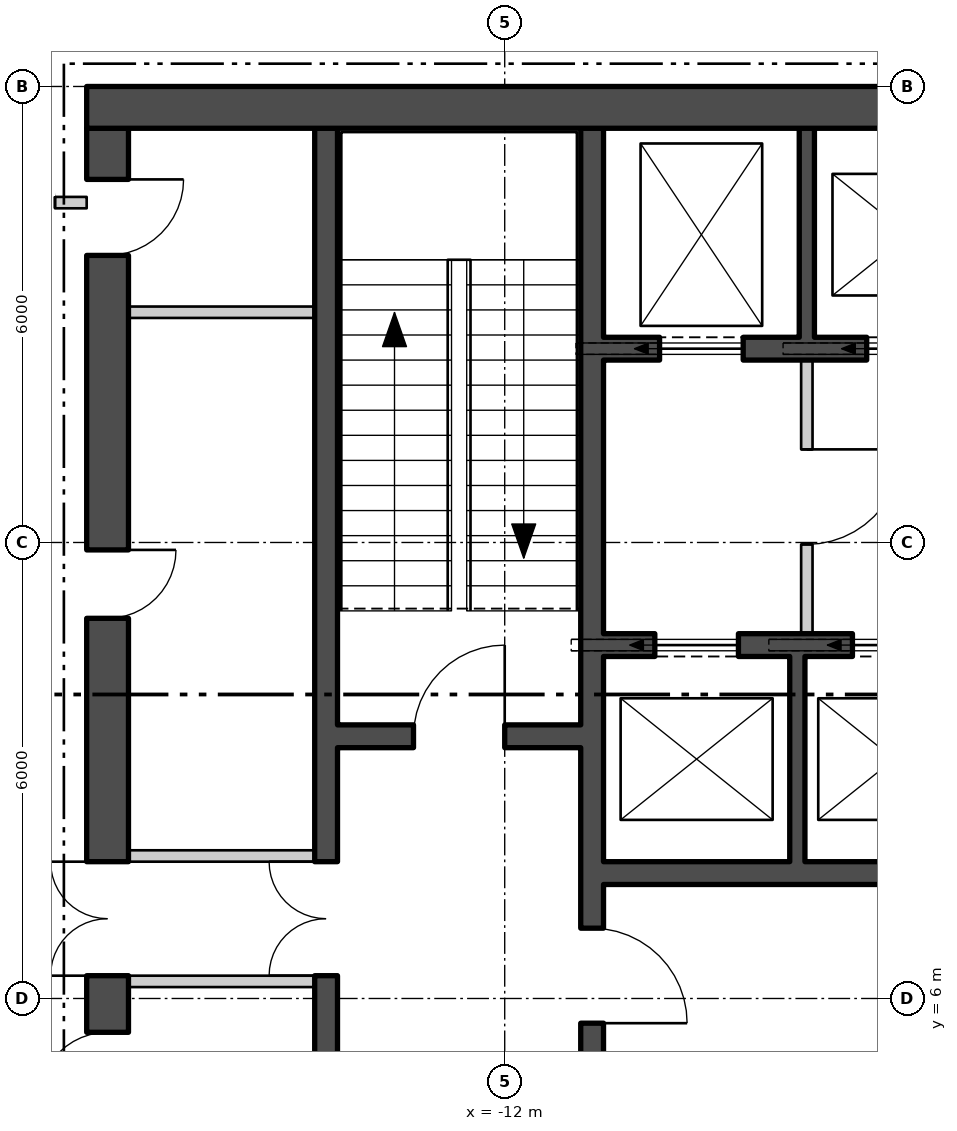
"""IFC4 building model, lengths in metres.
Left out: names, types, materials, properties, quantities, classifications, styles, units other than length and angle.
Written with IfcOpenShell. Run it as: python <this file> out.ifc"""

import sys

from ifc_helpers import new_model, si_unit, direction, frame, frame_2d, origin, place, context, subcontext, project, spatial, polyline, rectangle, outline, extrude, element, fill, save


model = new_model("IFC4")
c1 = context("Model", 3, precision=1e-05, world=origin(), true_north=direction((0.0, 1.0)))
c2 = subcontext(c1, "Body", "Model", "MODEL_VIEW")
j1 = project(units=[si_unit("LENGTHUNIT", "METRE"), si_unit("PLANEANGLEUNIT", "RADIAN")], contexts=[c1])
p1 = place(None, origin())
s1 = spatial("IfcSite", under=j1, at=p1, CompositionType="ELEMENT")
p2 = place(p1, origin())
s2 = spatial("IfcBuilding", under=s1, at=p2, CompositionType="ELEMENT")
p3 = place(p2, frame((0.0, 0.0, 97.8)))
s3 = spatial("IfcBuildingStorey", under=s2, at=p3, CompositionType="ELEMENT", Elevation=97.8)
p4 = place(p3, frame((-27.775, 11.479, -0.18), z_axis=(0.0, 0.0, 1.0), x_axis=(0.500000711659, -0.866024992908, 0.0)))
e1 = element("IfcWall", 1, at=p4, inside=s3, PredefinedType="SOLIDWALL", context=c2, shape_type="SweptSolid", body=[
    extrude(outline(polyline([(-0.13, -0.225), (45.87, -0.225), (45.61, 0.225), (0.13, 0.225), (-0.13, -0.225)])), origin(), (0.0, 0.0, 1.0), 4.28),
])
p5 = place(p4, frame((1.424, 0.0, 1.08)))
e2 = element("IfcOpeningElement", 2, at=p5, cuts=e1, PredefinedType="OPENING", context=c2, shape_type="SweptSolid", body=[
    extrude(rectangle(XDim=2.4, YDim=2.6, at=frame_2d((1.2, 1.3))), frame((0.0, 0.235, 0.0), z_axis=(0.0, -1.0, 0.0), x_axis=(1.0, 0.0, 0.0)), (0.0, 0.0, 1.0), 0.47),
])
p6 = place(p4, frame((5.893, 0.0, 1.08)))
e3 = element("IfcOpeningElement", 3, at=p6, cuts=e1, PredefinedType="OPENING", context=c2, shape_type="SweptSolid", body=[
    extrude(rectangle(XDim=2.4, YDim=2.6, at=frame_2d((1.2, 1.3))), frame((0.0, 0.235, 0.0), z_axis=(0.0, -1.0, 0.0), x_axis=(1.0, 0.0, 0.0)), (0.0, 0.0, 1.0), 0.47),
])
p7 = place(p4, frame((10.401, 0.0, 1.08)))
e4 = element("IfcOpeningElement", 4, at=p7, cuts=e1, PredefinedType="OPENING", context=c2, shape_type="SweptSolid", body=[
    extrude(rectangle(XDim=2.4, YDim=2.6, at=frame_2d((1.2, 1.3))), frame((0.0, 0.235, 0.0), z_axis=(0.0, -1.0, 0.0), x_axis=(1.0, 0.0, 0.0)), (0.0, 0.0, 1.0), 0.47),
])
p8 = place(p4, frame((14.909, 0.0, 1.08)))
e5 = element("IfcOpeningElement", 5, at=p8, cuts=e1, PredefinedType="OPENING", context=c2, shape_type="SweptSolid", body=[
    extrude(rectangle(XDim=2.4, YDim=2.6, at=frame_2d((1.2, 1.3))), frame((0.0, 0.235, 0.0), z_axis=(0.0, -1.0, 0.0), x_axis=(1.0, 0.0, 0.0)), (0.0, 0.0, 1.0), 0.47),
])
p9 = place(p4, frame((19.416, 0.0, 1.08)))
e6 = element("IfcOpeningElement", 6, at=p9, cuts=e1, PredefinedType="OPENING", context=c2, shape_type="SweptSolid", body=[
    extrude(rectangle(XDim=2.4, YDim=2.6, at=frame_2d((1.2, 1.3))), frame((0.0, 0.235, 0.0), z_axis=(0.0, -1.0, 0.0), x_axis=(1.0, 0.0, 0.0)), (0.0, 0.0, 1.0), 0.47),
])
p10 = place(p4, frame((23.924, 0.0, 1.08)))
e7 = element("IfcOpeningElement", 7, at=p10, cuts=e1, PredefinedType="OPENING", context=c2, shape_type="SweptSolid", body=[
    extrude(rectangle(XDim=2.4, YDim=2.6, at=frame_2d((1.2, 1.3))), frame((0.0, 0.235, 0.0), z_axis=(0.0, -1.0, 0.0), x_axis=(1.0, 0.0, 0.0)), (0.0, 0.0, 1.0), 0.47),
])
p11 = place(p4, frame((28.431, 0.0, 1.08)))
e8 = element("IfcOpeningElement", 8, at=p11, cuts=e1, PredefinedType="OPENING", context=c2, shape_type="SweptSolid", body=[
    extrude(rectangle(XDim=2.4, YDim=2.6, at=frame_2d((1.2, 1.3))), frame((0.0, 0.235, 0.0), z_axis=(0.0, -1.0, 0.0), x_axis=(1.0, 0.0, 0.0)), (0.0, 0.0, 1.0), 0.47),
])
p12 = place(p4, frame((32.939, 0.0, 1.08)))
e9 = element("IfcOpeningElement", 9, at=p12, cuts=e1, PredefinedType="OPENING", context=c2, shape_type="SweptSolid", body=[
    extrude(rectangle(XDim=2.4, YDim=2.6, at=frame_2d((1.2, 1.3))), frame((0.0, 0.235, 0.0), z_axis=(0.0, -1.0, 0.0), x_axis=(1.0, 0.0, 0.0)), (0.0, 0.0, 1.0), 0.47),
])
p13 = place(p4, frame((37.447, 0.0, 1.08)))
e10 = element("IfcOpeningElement", 10, at=p13, cuts=e1, PredefinedType="OPENING", context=c2, shape_type="SweptSolid", body=[
    extrude(rectangle(XDim=2.4, YDim=2.6, at=frame_2d((1.2, 1.3))), frame((0.0, 0.235, 0.0), z_axis=(0.0, -1.0, 0.0), x_axis=(1.0, 0.0, 0.0)), (0.0, 0.0, 1.0), 0.47),
])
p14 = place(p4, frame((41.916, 0.0, 1.08)))
e11 = element("IfcOpeningElement", 11, at=p14, cuts=e1, PredefinedType="OPENING", context=c2, shape_type="SweptSolid", body=[
    extrude(rectangle(XDim=2.4, YDim=2.6, at=frame_2d((1.2, 1.3))), frame((0.0, 0.235, 0.0), z_axis=(0.0, -1.0, 0.0), x_axis=(1.0, 0.0, 0.0)), (0.0, 0.0, 1.0), 0.47),
])
p15 = place(p3, frame((-17.5, 17.725, 0.0), z_axis=(0.0, 0.0, 1.0), x_axis=(1.0, 0.0, 0.0)))
e12 = element("IfcWall", 12, at=p15, inside=s3, PredefinedType="SHEAR", context=c2, shape_type="SweptSolid", body=[
    extrude(rectangle(XDim=35.0, YDim=0.55, at=frame_2d((17.5, 0.0))), origin(), (0.0, 0.0, 1.0), 4.3),
])
p16 = place(p3, frame((-17.225, 0.55, 0.0), z_axis=(0.0, 0.0, 1.0), x_axis=(0.0, 1.0, 0.0)))
e13 = element("IfcWall", 13, at=p16, inside=s3, PredefinedType="SHEAR", context=c2, shape_type="SweptSolid", body=[
    extrude(rectangle(XDim=16.9, YDim=0.55, at=frame_2d((8.45, 0.0))), origin(), (0.0, 0.0, 1.0), 4.3),
])
p17 = place(p16, frame((5.75, 0.0, 0.0)))
e14 = element("IfcOpeningElement", 14, at=p17, cuts=e13, PredefinedType="OPENING", context=c2, shape_type="SweptSolid", body=[
    extrude(rectangle(XDim=1.5, YDim=2.1, at=frame_2d((0.75, 1.05))), frame((0.0, 0.285, 0.0), z_axis=(0.0, -1.0, 0.0), x_axis=(1.0, 0.0, 0.0)), (0.0, 0.0, 1.0), 0.57),
])
p18 = place(p16, frame((1.23, 0.0, 0.0)))
e15 = element("IfcOpeningElement", 15, at=p18, cuts=e13, PredefinedType="OPENING", context=c2, shape_type="SweptSolid", body=[
    extrude(rectangle(XDim=0.9, YDim=2.1, at=frame_2d((0.45, 1.05))), frame((0.0, 0.285, 0.0), z_axis=(0.0, -1.0, 0.0), x_axis=(1.0, 0.0, 0.0)), (0.0, 0.0, 1.0), 0.57),
])
p19 = place(p16, frame((4.105, 0.0, 0.0)))
e16 = element("IfcOpeningElement", 16, at=p19, cuts=e13, PredefinedType="OPENING", context=c2, shape_type="SweptSolid", body=[
    extrude(rectangle(XDim=0.9, YDim=2.1, at=frame_2d((0.45, 1.05))), frame((0.0, 0.285, 0.0), z_axis=(0.0, -1.0, 0.0), x_axis=(1.0, 0.0, 0.0)), (0.0, 0.0, 1.0), 0.57),
])
p20 = place(p16, frame((10.452, 0.0, 0.0)))
e17 = element("IfcOpeningElement", 17, at=p20, cuts=e13, PredefinedType="OPENING", context=c2, shape_type="SweptSolid", body=[
    extrude(rectangle(XDim=0.9, YDim=2.1, at=frame_2d((0.45, 1.05))), frame((0.0, 0.285, 0.0), z_axis=(0.0, -1.0, 0.0), x_axis=(1.0, 0.0, 0.0)), (0.0, 0.0, 1.0), 0.57),
])
p21 = place(p16, frame((15.227, 0.0, 0.0)))
e18 = element("IfcOpeningElement", 18, at=p21, cuts=e13, PredefinedType="OPENING", context=c2, shape_type="SweptSolid", body=[
    extrude(rectangle(XDim=1.0, YDim=2.1, at=frame_2d((0.5, 1.05))), frame((0.0, 0.285, 0.0), z_axis=(0.0, -1.0, 0.0), x_axis=(1.0, 0.0, 0.0)), (0.0, 0.0, 1.0), 0.57),
])
p22 = place(p3, frame((-10.85, 0.55, 0.0), z_axis=(0.0, 0.0, 1.0), x_axis=(0.0, 1.0, 0.0)))
e19 = element("IfcWall", 19, at=p22, inside=s3, PredefinedType="SHEAR", context=c2, shape_type="SweptSolid", body=[
    extrude(rectangle(XDim=16.9, YDim=0.3, at=frame_2d((8.45, 0.0))), origin(), (0.0, 0.0, 1.0), 4.3),
])
p23 = place(p22, frame((5.125, 0.0, 0.0)))
e20 = element("IfcOpeningElement", 20, at=p23, cuts=e19, PredefinedType="OPENING", context=c2, shape_type="SweptSolid", body=[
    extrude(rectangle(XDim=1.25, YDim=2.1, at=frame_2d((0.625, 1.05))), frame((0.0, 0.16, 0.0), z_axis=(0.0, -1.0, 0.0), x_axis=(1.0, 0.0, 0.0)), (0.0, 0.0, 1.0), 0.32),
])
p24 = place(p22, frame((1.55, 0.0, 0.0)))
e21 = element("IfcOpeningElement", 21, at=p24, cuts=e19, PredefinedType="OPENING", context=c2, shape_type="SweptSolid", body=[
    extrude(rectangle(XDim=1.0, YDim=2.1, at=frame_2d((0.5, 1.05))), frame((0.0, 0.16, 0.0), z_axis=(0.0, -1.0, 0.0), x_axis=(1.0, 0.0, 0.0)), (0.0, 0.0, 1.0), 0.32),
])
p25 = place(p3, frame((-14.35, 0.55, 0.0), z_axis=(0.0, 0.0, 1.0), x_axis=(0.0, 1.0, 0.0)))
e22 = element("IfcWall", 22, at=p25, inside=s3, PredefinedType="SHEAR", context=c2, shape_type="SweptSolid", body=[
    extrude(rectangle(XDim=16.9, YDim=0.3, at=frame_2d((8.45, 0.0))), origin(), (0.0, 0.0, 1.0), 4.3),
])
p26 = place(p25, frame((5.75, 0.0, 0.0)))
e23 = element("IfcOpeningElement", 23, at=p26, cuts=e22, PredefinedType="OPENING", context=c2, shape_type="SweptSolid", body=[
    extrude(rectangle(XDim=1.5, YDim=2.1, at=frame_2d((0.75, 1.05))), frame((0.0, 0.16, 0.0), z_axis=(0.0, -1.0, 0.0), x_axis=(1.0, 0.0, 0.0)), (0.0, 0.0, 1.0), 0.32),
])
p27 = place(p3, frame((-14.2, 9.45, 0.0), z_axis=(0.0, 0.0, 1.0), x_axis=(1.0, 0.0, 0.0)))
e24 = element("IfcWall", 24, at=p27, inside=s3, PredefinedType="SHEAR", context=c2, shape_type="SweptSolid", body=[
    extrude(rectangle(XDim=3.2, YDim=0.3, at=frame_2d((1.6, 0.0))), origin(), (0.0, 0.0, 1.0), 4.3),
])
p28 = place(p27, frame((1.0, 0.0, 0.0)))
e25 = element("IfcOpeningElement", 25, at=p28, cuts=e24, PredefinedType="OPENING", context=c2, shape_type="SweptSolid", body=[
    extrude(rectangle(XDim=1.2, YDim=2.1, at=frame_2d((0.6, 1.05))), frame((0.0, 0.16, 0.0), z_axis=(0.0, -1.0, 0.0), x_axis=(1.0, 0.0, 0.0)), (0.0, 0.0, 1.0), 0.32),
])
p29 = place(p3, frame((-10.7, 14.55, 0.0), z_axis=(0.0, 0.0, 1.0), x_axis=(1.0, 0.0, 0.0)))
e26 = element("IfcWall", 26, at=p29, inside=s3, PredefinedType="SHEAR", context=c2, shape_type="SweptSolid", body=[
    extrude(rectangle(XDim=21.4, YDim=0.3, at=frame_2d((10.7, 0.0))), origin(), (0.0, 0.0, 1.0), 4.3),
])
p30 = place(p29, frame((0.738, 0.0, 0.0)))
e27 = element("IfcOpeningElement", 27, at=p30, cuts=e26, PredefinedType="OPENING", context=c2, shape_type="SweptSolid", body=[
    extrude(rectangle(XDim=1.1, YDim=2.1, at=frame_2d((0.55, 1.05))), frame((0.0, 0.16, 0.0), z_axis=(0.0, -1.0, 0.0), x_axis=(1.0, 0.0, 0.0)), (0.0, 0.0, 1.0), 0.32),
])
p31 = place(p29, frame((3.462, 0.0, 0.0)))
e28 = element("IfcOpeningElement", 28, at=p31, cuts=e26, PredefinedType="OPENING", context=c2, shape_type="SweptSolid", body=[
    extrude(rectangle(XDim=1.1, YDim=2.1, at=frame_2d((0.55, 1.05))), frame((0.0, 0.16, 0.0), z_axis=(0.0, -1.0, 0.0), x_axis=(1.0, 0.0, 0.0)), (0.0, 0.0, 1.0), 0.32),
])
p32 = place(p29, frame((6.138, 0.0, 0.0)))
e29 = element("IfcOpeningElement", 29, at=p32, cuts=e26, PredefinedType="OPENING", context=c2, shape_type="SweptSolid", body=[
    extrude(rectangle(XDim=1.1, YDim=2.1, at=frame_2d((0.55, 1.05))), frame((0.0, 0.16, 0.0), z_axis=(0.0, -1.0, 0.0), x_axis=(1.0, 0.0, 0.0)), (0.0, 0.0, 1.0), 0.32),
])
p33 = place(p29, frame((8.812, 0.0, 0.0)))
e30 = element("IfcOpeningElement", 30, at=p33, cuts=e26, PredefinedType="OPENING", context=c2, shape_type="SweptSolid", body=[
    extrude(rectangle(XDim=1.1, YDim=2.1, at=frame_2d((0.55, 1.05))), frame((0.0, 0.16, 0.0), z_axis=(0.0, -1.0, 0.0), x_axis=(1.0, 0.0, 0.0)), (0.0, 0.0, 1.0), 0.32),
])
p34 = place(p29, frame((14.162, 0.0, 0.0)))
e31 = element("IfcOpeningElement", 31, at=p34, cuts=e26, PredefinedType="OPENING", context=c2, shape_type="SweptSolid", body=[
    extrude(rectangle(XDim=1.1, YDim=2.1, at=frame_2d((0.55, 1.05))), frame((0.0, 0.16, 0.0), z_axis=(0.0, -1.0, 0.0), x_axis=(1.0, 0.0, 0.0)), (0.0, 0.0, 1.0), 0.32),
])
p35 = place(p29, frame((16.837, 0.0, 0.0)))
e32 = element("IfcOpeningElement", 32, at=p35, cuts=e26, PredefinedType="OPENING", context=c2, shape_type="SweptSolid", body=[
    extrude(rectangle(XDim=1.1, YDim=2.1, at=frame_2d((0.55, 1.05))), frame((0.0, 0.16, 0.0), z_axis=(0.0, -1.0, 0.0), x_axis=(1.0, 0.0, 0.0)), (0.0, 0.0, 1.0), 0.32),
])
p36 = place(p29, frame((19.562, 0.0, 0.0)))
e33 = element("IfcOpeningElement", 33, at=p36, cuts=e26, PredefinedType="OPENING", context=c2, shape_type="SweptSolid", body=[
    extrude(rectangle(XDim=1.1, YDim=2.1, at=frame_2d((0.55, 1.05))), frame((0.0, 0.16, 0.0), z_axis=(0.0, -1.0, 0.0), x_axis=(1.0, 0.0, 0.0)), (0.0, 0.0, 1.0), 0.32),
])
p37 = place(p3, frame((-10.7, 10.65, 0.0), z_axis=(0.0, 0.0, 1.0), x_axis=(1.0, 0.0, 0.0)))
e34 = element("IfcWall", 34, at=p37, inside=s3, PredefinedType="SHEAR", context=c2, shape_type="SweptSolid", body=[
    extrude(rectangle(XDim=10.3, YDim=0.3, at=frame_2d((5.15, 0.0))), origin(), (0.0, 0.0, 1.0), 4.3),
])
p38 = place(p37, frame((0.675, 0.0, 0.0)))
e35 = element("IfcOpeningElement", 35, at=p38, cuts=e34, PredefinedType="OPENING", context=c2, shape_type="SweptSolid", body=[
    extrude(rectangle(XDim=1.1, YDim=2.1, at=frame_2d((0.55, 1.05))), frame((0.0, 0.16, 0.0), z_axis=(0.0, -1.0, 0.0), x_axis=(1.0, 0.0, 0.0)), (0.0, 0.0, 1.0), 0.32),
])
p39 = place(p37, frame((3.275, 0.0, 0.0)))
e36 = element("IfcOpeningElement", 36, at=p39, cuts=e34, PredefinedType="OPENING", context=c2, shape_type="SweptSolid", body=[
    extrude(rectangle(XDim=1.1, YDim=2.1, at=frame_2d((0.55, 1.05))), frame((0.0, 0.16, 0.0), z_axis=(0.0, -1.0, 0.0), x_axis=(1.0, 0.0, 0.0)), (0.0, 0.0, 1.0), 0.32),
])
p40 = place(p37, frame((5.825, 0.0, 0.0)))
e37 = element("IfcOpeningElement", 37, at=p40, cuts=e34, PredefinedType="OPENING", context=c2, shape_type="SweptSolid", body=[
    extrude(rectangle(XDim=1.1, YDim=2.1, at=frame_2d((0.55, 1.05))), frame((0.0, 0.16, 0.0), z_axis=(0.0, -1.0, 0.0), x_axis=(1.0, 0.0, 0.0)), (0.0, 0.0, 1.0), 0.32),
])
p41 = place(p37, frame((8.375, 0.0, 0.0)))
e38 = element("IfcOpeningElement", 38, at=p41, cuts=e34, PredefinedType="OPENING", context=c2, shape_type="SweptSolid", body=[
    extrude(rectangle(XDim=1.1, YDim=2.1, at=frame_2d((0.55, 1.05))), frame((0.0, 0.16, 0.0), z_axis=(0.0, -1.0, 0.0), x_axis=(1.0, 0.0, 0.0)), (0.0, 0.0, 1.0), 0.32),
])
p42 = place(p3, frame((-10.7, 7.65, 0.0), z_axis=(0.0, 0.0, 1.0), x_axis=(1.0, 0.0, 0.0)))
e39 = element("IfcWall", 39, at=p42, inside=s3, PredefinedType="SHEAR", context=c2, shape_type="SweptSolid", body=[
    extrude(rectangle(XDim=10.3, YDim=0.3, at=frame_2d((5.15, 0.0))), origin(), (0.0, 0.0, 1.0), 4.3),
])
p43 = place(p3, frame((-8.025, 14.7, 0.0), z_axis=(0.0, 0.0, 1.0), x_axis=(0.0, 1.0, 0.0)))
e40 = element("IfcWall", 40, at=p43, inside=s3, PredefinedType="SHEAR", context=c2, shape_type="SweptSolid", body=[
    extrude(rectangle(XDim=2.75, YDim=0.2, at=frame_2d((1.375, 0.0))), origin(), (0.0, 0.0, 1.0), 4.3),
])
p44 = place(p3, frame((-8.15, 7.8, 0.0), z_axis=(0.0, 0.0, 1.0), x_axis=(0.0, 1.0, 0.0)))
e41 = element("IfcWall", 41, at=p44, inside=s3, PredefinedType="SHEAR", context=c2, shape_type="SweptSolid", body=[
    extrude(rectangle(XDim=2.7, YDim=0.2, at=frame_2d((1.35, 0.0))), origin(), (0.0, 0.0, 1.0), 4.3),
])
p45 = place(p3, frame((-8.025, 10.8, 0.0), z_axis=(0.0, 0.0, 1.0), x_axis=(0.0, 1.0, 0.0)))
e42 = element("IfcWall", 42, at=p45, inside=s3, PredefinedType="PARTITIONING", context=c2, shape_type="SweptSolid", body=[
    extrude(rectangle(XDim=3.6, YDim=0.15, at=frame_2d((1.8, 0.0))), origin(), (0.0, 0.0, 1.0), 4.3),
])
p46 = place(p45, frame((1.175, 0.0, 0.0)))
e43 = element("IfcOpeningElement", 43, at=p46, cuts=e42, PredefinedType="OPENING", context=c2, shape_type="SweptSolid", body=[
    extrude(rectangle(XDim=1.25, YDim=2.1, at=frame_2d((0.625, 1.05))), frame((0.0, 0.085, 0.0), z_axis=(0.0, -1.0, 0.0), x_axis=(1.0, 0.0, 0.0)), (0.0, 0.0, 1.0), 0.17),
])
for number, where, z_axis, x_axis in (
    (44, (-16.95, 6.225, 0.0), (0.0, 0.0, 1.0), (1.0, 0.0, 0.0)),
    (45, (-16.95, 7.875, 0.0), (0.0, 0.0, 1.0), (1.0, 0.0, 0.0)),
    (46, (-16.95, 15.029, 0.0), (0.0, 0.0, 1.0), (1.0, 0.0, 0.0)),
):
    element("IfcWall", number, at=place(p3, frame(where, z_axis=z_axis, x_axis=x_axis)), inside=s3, PredefinedType="PARTITIONING", context=c2, shape_type="SweptSolid", body=[
        extrude(rectangle(XDim=2.45, YDim=0.15, at=frame_2d((1.225, 0.0))), origin(), (0.0, 0.0, 1.0), 4.3),
    ])
p47 = place(p3, frame((-19.225, 16.472, 0.0), z_axis=(0.0, 0.0, 1.0), x_axis=(1.0, 0.0, 0.0)))
e47 = element("IfcWall", 47, at=p47, inside=s3, PredefinedType="PARTITIONING", context=c2, shape_type="SweptSolid", body=[
    extrude(rectangle(XDim=1.725, YDim=0.15, at=frame_2d((0.863, 0.0))), origin(), (0.0, 0.0, 1.0), 4.3),
])
p48 = place(p47, frame((0.308, 0.0, 0.0)))
e48 = element("IfcOpeningElement", 48, at=p48, cuts=e47, PredefinedType="OPENING", context=c2, shape_type="SweptSolid", body=[
    extrude(rectangle(XDim=1.0, YDim=2.1, at=frame_2d((0.5, 1.05))), frame((0.0, 0.085, 0.0), z_axis=(0.0, -1.0, 0.0), x_axis=(1.0, 0.0, 0.0)), (0.0, 0.0, 1.0), 0.17),
])
p49 = place(p30, origin())
e49 = element("IfcDoor", 49, at=p49, inside=s3, OperationType="SLIDING_TO_LEFT", PredefinedType="DOOR", context=c2, shape_type="SweptSolid", body=[
    extrude(rectangle(XDim=1.1, YDim=2.1, at=frame_2d((0.55, 1.05))), frame((0.0, 0.025, 0.0), z_axis=(0.0, -1.0, 0.0), x_axis=(1.0, 0.0, 0.0)), (0.0, 0.0, 1.0), 0.05),
])
fill(e27, e49)
p50 = place(p31, origin())
e50 = element("IfcDoor", 50, at=p50, inside=s3, OperationType="SLIDING_TO_LEFT", PredefinedType="DOOR", context=c2, shape_type="SweptSolid", body=[
    extrude(rectangle(XDim=1.1, YDim=2.1, at=frame_2d((0.55, 1.05))), frame((0.0, 0.025, 0.0), z_axis=(0.0, -1.0, 0.0), x_axis=(1.0, 0.0, 0.0)), (0.0, 0.0, 1.0), 0.05),
])
fill(e28, e50)
p51 = place(p38, origin())
e51 = element("IfcDoor", 51, at=p51, inside=s3, OperationType="SLIDING_TO_LEFT", PredefinedType="DOOR", context=c2, shape_type="SweptSolid", body=[
    extrude(rectangle(XDim=1.1, YDim=2.1, at=frame_2d((0.55, 1.05))), frame((0.0, 0.025, 0.0), z_axis=(0.0, -1.0, 0.0), x_axis=(1.0, 0.0, 0.0)), (0.0, 0.0, 1.0), 0.05),
])
fill(e35, e51)
p52 = place(p39, origin())
e52 = element("IfcDoor", 52, at=p52, inside=s3, OperationType="SLIDING_TO_LEFT", PredefinedType="DOOR", context=c2, shape_type="SweptSolid", body=[
    extrude(rectangle(XDim=1.1, YDim=2.1, at=frame_2d((0.55, 1.05))), frame((0.0, 0.025, 0.0), z_axis=(0.0, -1.0, 0.0), x_axis=(1.0, 0.0, 0.0)), (0.0, 0.0, 1.0), 0.05),
])
fill(e36, e52)
p53 = place(p46, origin())
e53 = element("IfcDoor", 53, at=p53, inside=s3, OperationType="SINGLE_SWING_RIGHT", PredefinedType="DOOR", context=c2, shape_type="SweptSolid", body=[
    extrude(rectangle(XDim=1.25, YDim=2.1, at=frame_2d((0.625, 1.05))), frame((0.0, 0.025, 0.0), z_axis=(0.0, -1.0, 0.0), x_axis=(1.0, 0.0, 0.0)), (0.0, 0.0, 1.0), 0.05),
])
fill(e43, e53)
p54 = place(p28, origin())
e54 = element("IfcDoor", 54, at=p54, inside=s3, OperationType="SINGLE_SWING_LEFT", PredefinedType="DOOR", context=c2, shape_type="SweptSolid", body=[
    extrude(rectangle(XDim=1.2, YDim=2.1, at=frame_2d((0.6, 1.05))), frame((0.0, 0.025, 0.0), z_axis=(0.0, -1.0, 0.0), x_axis=(1.0, 0.0, 0.0)), (0.0, 0.0, 1.0), 0.05),
])
fill(e25, e54)
p55 = place(p23, origin())
e55 = element("IfcDoor", 55, at=p55, inside=s3, OperationType="SINGLE_SWING_LEFT", PredefinedType="DOOR", context=c2, shape_type="SweptSolid", body=[
    extrude(rectangle(XDim=1.25, YDim=2.1, at=frame_2d((0.625, 1.05))), frame((0.0, 0.025, 0.0), z_axis=(0.0, -1.0, 0.0), x_axis=(1.0, 0.0, 0.0)), (0.0, 0.0, 1.0), 0.05),
])
fill(e20, e55)
p56 = place(p26, origin())
e56 = element("IfcDoor", 56, at=p56, inside=s3, OperationType="DOUBLE_DOOR_SINGLE_SWING", PredefinedType="DOOR", context=c2, shape_type="SweptSolid", body=[
    extrude(rectangle(XDim=1.5, YDim=2.1, at=frame_2d((0.75, 1.05))), frame((0.0, 0.025, 0.0), z_axis=(0.0, -1.0, 0.0), x_axis=(1.0, 0.0, 0.0)), (0.0, 0.0, 1.0), 0.05),
])
fill(e23, e56)
p57 = place(p17, origin())
e57 = element("IfcDoor", 57, at=p57, inside=s3, OperationType="DOUBLE_DOOR_SINGLE_SWING", PredefinedType="DOOR", context=c2, shape_type="SweptSolid", body=[
    extrude(rectangle(XDim=1.5, YDim=2.1, at=frame_2d((0.75, 1.05))), frame((0.0, 0.025, 0.0), z_axis=(0.0, -1.0, 0.0), x_axis=(1.0, 0.0, 0.0)), (0.0, 0.0, 1.0), 0.05),
])
fill(e14, e57)
p58 = place(p19, origin())
e58 = element("IfcDoor", 58, at=p58, inside=s3, OperationType="SINGLE_SWING_RIGHT", PredefinedType="DOOR", context=c2, shape_type="SweptSolid", body=[
    extrude(rectangle(XDim=0.9, YDim=2.1, at=frame_2d((0.45, 1.05))), frame((0.0, 0.025, 0.0), z_axis=(0.0, -1.0, 0.0), x_axis=(1.0, 0.0, 0.0)), (0.0, 0.0, 1.0), 0.05),
])
fill(e16, e58)
p59 = place(p20, origin())
e59 = element("IfcDoor", 59, at=p59, inside=s3, OperationType="SINGLE_SWING_RIGHT", PredefinedType="DOOR", context=c2, shape_type="SweptSolid", body=[
    extrude(rectangle(XDim=0.9, YDim=2.1, at=frame_2d((0.45, 1.05))), frame((0.0, 0.025, 0.0), z_axis=(0.0, -1.0, 0.0), x_axis=(1.0, 0.0, 0.0)), (0.0, 0.0, 1.0), 0.05),
])
fill(e17, e59)
p60 = place(p21, origin())
e60 = element("IfcDoor", 60, at=p60, inside=s3, OperationType="SINGLE_SWING_RIGHT", PredefinedType="DOOR", context=c2, shape_type="SweptSolid", body=[
    extrude(rectangle(XDim=1.0, YDim=2.1, at=frame_2d((0.5, 1.05))), frame((0.0, 0.025, 0.0), z_axis=(0.0, -1.0, 0.0), x_axis=(1.0, 0.0, 0.0)), (0.0, 0.0, 1.0), 0.05),
])
fill(e18, e60)
p61 = place(p48, origin())
e61 = element("IfcDoor", 61, at=p61, inside=s3, OperationType="SINGLE_SWING_RIGHT", PredefinedType="DOOR", context=c2, shape_type="SweptSolid", body=[
    extrude(rectangle(XDim=1.0, YDim=2.1, at=frame_2d((0.5, 1.05))), frame((0.0, 0.025, 0.0), z_axis=(0.0, -1.0, 0.0), x_axis=(1.0, 0.0, 0.0)), (0.0, 0.0, 1.0), 0.05),
])
fill(e48, e61)
save(model, sys.argv[1])
